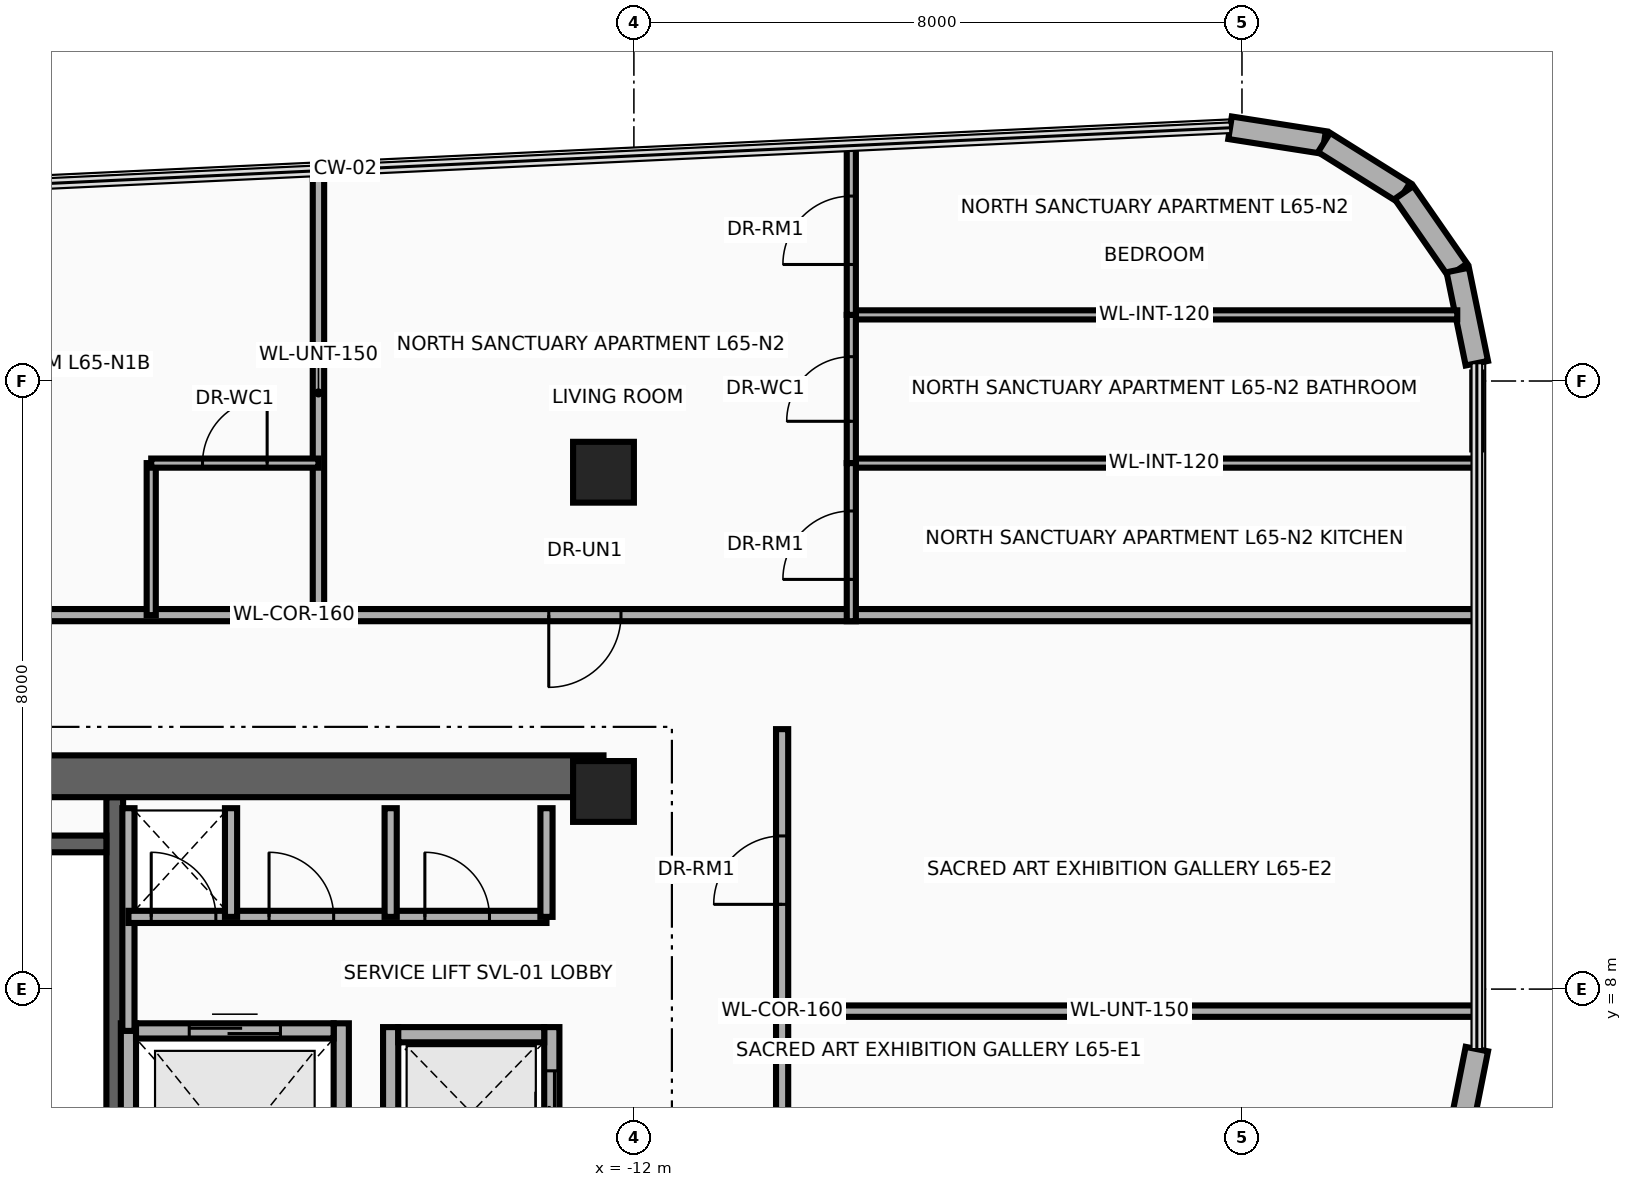
"""IFC4 building model, lengths in metres.
Left out: names, types, materials, properties, quantities, classifications, styles, units other than length and angle.
Written with IfcOpenShell. Run it as: python <this file> out.ifc"""

import sys

from ifc_helpers import new_model, si_unit, direction, frame, frame_2d, origin, origin_2d, place, context, subcontext, project, spatial, rectangle, extrude, source, transform, mapped, element, fill, save


model = new_model("IFC4")
c1 = context("Model", 3, precision=1e-05, world=origin(), true_north=direction((0.0, 1.0)))
c2 = subcontext(c1, "Body", "Model", "MODEL_VIEW")
j1 = project(units=[si_unit("LENGTHUNIT", "METRE"), si_unit("PLANEANGLEUNIT", "RADIAN")], contexts=[c1])
p1 = place(None, origin())
s1 = spatial("IfcSite", under=j1, at=p1, CompositionType="ELEMENT")
p2 = place(p1, origin())
s2 = spatial("IfcBuilding", under=s1, at=p2, CompositionType="ELEMENT")
p3 = place(p2, frame((0.0, 0.0, 251.0)))
s3 = spatial("IfcBuildingStorey", under=s2, at=p3, CompositionType="ELEMENT", Elevation=251.0)
p4 = place(p3, frame((-18.83, 1.78, 0.0), z_axis=(0.0, 0.0, 1.0), x_axis=(0.0, 1.0, 0.0)))
e1 = element("IfcWall", 1, at=p4, inside=s3, PredefinedType="SHEAR", context=c2, shape_type="SweptSolid", body=[
    extrude(rectangle(XDim=8.745, YDim=0.22, at=frame_2d((4.373, 0.0))), origin(), (0.0, 0.0, 1.0), 3.26),
])
p5 = place(p3, frame((-22.05, 9.91, 0.0), z_axis=(0.0, 0.0, 1.0), x_axis=(1.0, 0.0, 0.0)))
e2 = element("IfcWall", 2, at=p5, inside=s3, PredefinedType="SHEAR", context=c2, shape_type="SweptSolid", body=[
    extrude(rectangle(XDim=3.11, YDim=0.22, at=frame_2d((1.555, 0.0))), origin(), (0.0, 0.0, 1.0), 3.26),
])
p6 = place(p3, frame((-22.65, 10.8, 0.0), z_axis=(0.0, 0.0, 1.0), x_axis=(1.0, 0.0, 0.0)))
e3 = element("IfcWall", 3, at=p6, inside=s3, PredefinedType="SHEAR", context=c2, shape_type="SweptSolid", body=[
    extrude(rectangle(XDim=10.25, YDim=0.55, at=frame_2d((5.125, 0.0))), origin(), (0.0, 0.0, 1.0), 3.26),
])
m1 = source(origin(), c2, "Body", "SweptSolid", [
    extrude(rectangle(XDim=0.8, YDim=0.8, at=origin_2d()), origin(), (0.0, 0.0, 1.0), 3.5),
])
for number, where, z_axis, x_axis in (
    (4, (-12.4, 10.6, 0.0), (0.0, 0.0, 1.0), (1.0, 0.0, 0.0)),
    (5, (-12.4, 14.8, 0.0), (0.0, 0.0, 1.0), (1.0, 0.0, 0.0)),
):
    element("IfcColumn", number, at=place(p3, frame(where, z_axis=z_axis, x_axis=x_axis)), inside=s3, PredefinedType="COLUMN", context=c2, shape_type="MappedRepresentation", body=[
        mapped(m1, transform((0.0, 0.0, 0.0), x_axis=(1.0, 0.0, 0.0), y_axis=(0.0, 1.0, 0.0), z_axis=(0.0, 0.0, 1.0), scale=1.0)),
    ])
p7 = place(p3, frame((-4.157, 19.332, 0.0), z_axis=(0.0, 0.0, 1.0), x_axis=(0.987969236552, -0.15465053387, 0.0)))
e6 = element("IfcWall", 6, at=p7, inside=s3, PredefinedType="SOLIDWALL", context=c2, shape_type="SweptSolid", body=[
    extrude(rectangle(XDim=1.252, YDim=0.3, at=frame_2d((0.626, 0.0))), origin(), (0.0, 0.0, 1.0), 3.26),
])
for number, where, z_axis, x_axis in (
    (7, (-2.92, 19.138, 0.0), (0.0, 0.0, 1.0), (0.847, -0.531, 0.0)),
    (8, (-1.869, 18.48, 0.0), (0.0, 0.0, 1.0), (0.57, -0.822, 0.0)),
):
    element("IfcWall", number, at=place(p3, frame(where, z_axis=z_axis, x_axis=x_axis)), inside=s3, PredefinedType="SOLIDWALL", context=c2, shape_type="SweptSolid", body=[
        extrude(rectangle(XDim=1.24, YDim=0.3, at=frame_2d((0.62, 0.0))), origin(), (0.0, 0.0, 1.0), 3.26),
    ])
p8 = place(p3, frame((-1.161, 17.461, 0.0), z_axis=(0.0, 0.0, 1.0), x_axis=(0.20087696073, -0.979616479367, 0.0)))
e9 = element("IfcWall", 9, at=p8, inside=s3, PredefinedType="SOLIDWALL", context=c2, shape_type="SweptSolid", body=[
    extrude(rectangle(XDim=1.252, YDim=0.3, at=frame_2d((0.626, 0.0))), origin(), (0.0, 0.0, 1.0), 3.26),
])
p9 = place(p3, frame((-0.91, 7.211, 0.0), z_axis=(0.0, 0.0, 1.0), x_axis=(-0.195189223115, -0.980765602568, 0.0)))
e10 = element("IfcWall", 10, at=p9, inside=s3, PredefinedType="SOLIDWALL", context=c2, shape_type="SweptSolid", body=[
    extrude(rectangle(XDim=1.216, YDim=0.3, at=frame_2d((0.608, 0.0))), origin(), (0.0, 0.0, 1.0), 3.26),
])
for number, where, z_axis, x_axis in (
    (11, (-18.65, 4.225, 0.0), (0.0, 0.0, 1.0), (0.0, 1.0, 0.0)),
    (12, (-15.85, 4.225, 0.0), (0.0, 0.0, 1.0), (0.0, 1.0, 0.0)),
):
    element("IfcWall", number, at=place(p3, frame(where, z_axis=z_axis, x_axis=x_axis)), inside=s3, PredefinedType="MOVABLE", context=c2, shape_type="SweptSolid", body=[
        extrude(rectangle(XDim=3.325, YDim=0.2, at=frame_2d((1.663, 0.0))), origin(), (0.0, 0.0, 1.0), 3.26),
    ])
p10 = place(p3, frame((-18.55, 7.45, 0.0), z_axis=(0.0, 0.0, 1.0), x_axis=(1.0, 0.0, 0.0)))
e13 = element("IfcWall", 13, at=p10, inside=s3, PredefinedType="MOVABLE", context=c2, shape_type="SweptSolid", body=[
    extrude(rectangle(XDim=2.6, YDim=0.2, at=frame_2d((1.3, 0.0))), origin(), (0.0, 0.0, 1.0), 3.26),
])
p11 = place(p10, frame((0.7, 0.0, 0.0)))
e14 = element("IfcOpeningElement", 14, at=p11, cuts=e13, PredefinedType="OPENING", context=c2, shape_type="SweptSolid", body=[
    extrude(rectangle(XDim=1.2, YDim=2.1, at=frame_2d((0.6, 1.05))), frame((0.0, 0.115, 0.0), z_axis=(0.0, -1.0, 0.0), x_axis=(1.0, 0.0, 0.0)), (0.0, 0.0, 1.0), 0.23),
])
p12 = place(p3, frame((-15.2, 5.25, 0.0), z_axis=(0.0, 0.0, 1.0), x_axis=(0.0, 1.0, 0.0)))
e15 = element("IfcWall", 15, at=p12, inside=s3, PredefinedType="MOVABLE", context=c2, shape_type="SweptSolid", body=[
    extrude(rectangle(XDim=2.25, YDim=0.2, at=frame_2d((1.125, 0.0))), origin(), (0.0, 0.0, 1.0), 3.26),
])
p13 = place(p3, frame((-13.08, 5.25, 0.0), z_axis=(0.0, 0.0, 1.0), x_axis=(0.0, 1.0, 0.0)))
e16 = element("IfcWall", 16, at=p13, inside=s3, PredefinedType="MOVABLE", context=c2, shape_type="SweptSolid", body=[
    extrude(rectangle(XDim=2.25, YDim=0.2, at=frame_2d((1.125, 0.0))), origin(), (0.0, 0.0, 1.0), 3.26),
])
p14 = place(p13, frame((0.575, 0.0, 0.0)))
e17 = element("IfcOpeningElement", 17, at=p14, cuts=e16, PredefinedType="OPENING", context=c2, shape_type="SweptSolid", body=[
    extrude(rectangle(XDim=1.1, YDim=2.1, at=frame_2d((0.55, 1.05))), frame((0.0, 0.115, 0.0), z_axis=(0.0, -1.0, 0.0), x_axis=(1.0, 0.0, 0.0)), (0.0, 0.0, 1.0), 0.23),
])
p15 = place(p3, frame((-15.1, 7.4, 0.0), z_axis=(0.0, 0.0, 1.0), x_axis=(1.0, 0.0, 0.0)))
e18 = element("IfcWall", 18, at=p15, inside=s3, PredefinedType="MOVABLE", context=c2, shape_type="SweptSolid", body=[
    extrude(rectangle(XDim=1.92, YDim=0.2, at=frame_2d((0.96, 0.0))), origin(), (0.0, 0.0, 1.0), 3.26),
])
p16 = place(p3, frame((-18.65, 7.45, 0.0), z_axis=(0.0, 0.0, 1.0), x_axis=(0.0, 1.0, 0.0)))
e19 = element("IfcWall", 19, at=p16, inside=s3, PredefinedType="PARTITIONING", context=c2, shape_type="SweptSolid", body=[
    extrude(rectangle(XDim=2.93, YDim=0.16, at=frame_2d((1.465, 0.0))), origin(), (0.0, 0.0, 1.0), 3.26),
])
p17 = place(p3, frame((-18.65, 8.95, 0.0), z_axis=(0.0, 0.0, 1.0), x_axis=(1.0, 0.0, 0.0)))
e20 = element("IfcWall", 20, at=p17, inside=s3, PredefinedType="PARTITIONING", context=c2, shape_type="SweptSolid", body=[
    extrude(rectangle(XDim=5.5, YDim=0.16, at=frame_2d((2.75, 0.0))), origin(), (0.0, 0.0, 1.0), 3.26),
])
p18 = place(p17, frame((0.3, 0.0, 0.0)))
e21 = element("IfcOpeningElement", 21, at=p18, cuts=e20, PredefinedType="OPENING", context=c2, shape_type="SweptSolid", body=[
    extrude(rectangle(XDim=0.85, YDim=2.05, at=frame_2d((0.425, 1.025))), frame((0.0, 0.095, 0.0), z_axis=(0.0, -1.0, 0.0), x_axis=(1.0, 0.0, 0.0)), (0.0, 0.0, 1.0), 0.19),
])
p19 = place(p17, frame((1.85, 0.0, 0.0)))
e22 = element("IfcOpeningElement", 22, at=p19, cuts=e20, PredefinedType="OPENING", context=c2, shape_type="SweptSolid", body=[
    extrude(rectangle(XDim=0.85, YDim=2.05, at=frame_2d((0.425, 1.025))), frame((0.0, 0.095, 0.0), z_axis=(0.0, -1.0, 0.0), x_axis=(1.0, 0.0, 0.0)), (0.0, 0.0, 1.0), 0.19),
])
p20 = place(p17, frame((3.9, 0.0, 0.0)))
e23 = element("IfcOpeningElement", 23, at=p20, cuts=e20, PredefinedType="OPENING", context=c2, shape_type="SweptSolid", body=[
    extrude(rectangle(XDim=0.85, YDim=2.05, at=frame_2d((0.425, 1.025))), frame((0.0, 0.095, 0.0), z_axis=(0.0, -1.0, 0.0), x_axis=(1.0, 0.0, 0.0)), (0.0, 0.0, 1.0), 0.19),
])
for number, where, z_axis, x_axis in (
    (24, (-13.15, 8.95, 0.0), (0.0, 0.0, 1.0), (0.0, 1.0, 0.0)),
    (25, (-17.3, 8.95, 0.0), (0.0, 0.0, 1.0), (0.0, 1.0, 0.0)),
    (26, (-15.2, 8.95, 0.0), (0.0, 0.0, 1.0), (0.0, 1.0, 0.0)),
):
    element("IfcWall", number, at=place(p3, frame(where, z_axis=z_axis, x_axis=x_axis)), inside=s3, PredefinedType="PARTITIONING", context=c2, shape_type="SweptSolid", body=[
        extrude(rectangle(XDim=1.43, YDim=0.16, at=frame_2d((0.715, 0.0))), origin(), (0.0, 0.0, 1.0), 3.26),
    ])
p21 = place(p3, frame((-32.04, 12.92, 0.0), z_axis=(0.0, 0.0, 1.0), x_axis=(1.0, 0.0, 0.0)))
e27 = element("IfcWall", 27, at=p21, inside=s3, PredefinedType="PARTITIONING", context=c2, shape_type="SweptSolid", body=[
    extrude(rectangle(XDim=31.13, YDim=0.16, at=frame_2d((15.565, 0.0))), origin(), (0.0, 0.0, 1.0), 2.634),
])
p22 = place(p21, frame((3.498, 0.0, 0.0)))
e28 = element("IfcOpeningElement", 28, at=p22, cuts=e27, PredefinedType="OPENING", context=c2, shape_type="SweptSolid", body=[
    extrude(rectangle(XDim=0.95, YDim=2.15, at=frame_2d((0.475, 1.075))), frame((0.0, 0.095, 0.0), z_axis=(0.0, -1.0, 0.0), x_axis=(1.0, 0.0, 0.0)), (0.0, 0.0, 1.0), 0.19),
])
p23 = place(p21, frame((10.342, 0.0, 0.0)))
e29 = element("IfcOpeningElement", 29, at=p23, cuts=e27, PredefinedType="OPENING", context=c2, shape_type="SweptSolid", body=[
    extrude(rectangle(XDim=0.95, YDim=2.15, at=frame_2d((0.475, 1.075))), frame((0.0, 0.095, 0.0), z_axis=(0.0, -1.0, 0.0), x_axis=(1.0, 0.0, 0.0)), (0.0, 0.0, 1.0), 0.19),
])
p24 = place(p21, frame((18.92, 0.0, 0.0)))
e30 = element("IfcOpeningElement", 30, at=p24, cuts=e27, PredefinedType="OPENING", context=c2, shape_type="SweptSolid", body=[
    extrude(rectangle(XDim=0.95, YDim=2.15, at=frame_2d((0.475, 1.075))), frame((0.0, 0.095, 0.0), z_axis=(0.0, -1.0, 0.0), x_axis=(1.0, 0.0, 0.0)), (0.0, 0.0, 1.0), 0.19),
])
p25 = place(p3, frame((-16.15, 12.92, 0.0), z_axis=(0.0, 0.0, 1.0), x_axis=(0.0, 1.0, 0.0)))
e31 = element("IfcWall", 31, at=p25, inside=s3, PredefinedType="PARTITIONING", context=c2, shape_type="SweptSolid", body=[
    extrude(rectangle(XDim=5.846, YDim=0.15, at=frame_2d((2.923, 0.0))), origin(), (0.0, 0.0, 1.0), 2.544),
])
p26 = place(p3, frame((-18.35, 12.92, 0.0), z_axis=(0.0, 0.0, 1.0), x_axis=(0.0, 1.0, 0.0)))
e32 = element("IfcWall", 32, at=p26, inside=s3, PredefinedType="PARTITIONING", context=c2, shape_type="SweptSolid", body=[
    extrude(rectangle(XDim=2.0, YDim=0.12, at=frame_2d((1.0, 0.0))), origin(), (0.0, 0.0, 1.0), 2.544),
])
p27 = place(p3, frame((-18.35, 14.92, 0.0), z_axis=(0.0, 0.0, 1.0), x_axis=(1.0, 0.0, 0.0)))
e33 = element("IfcWall", 33, at=p27, inside=s3, PredefinedType="PARTITIONING", context=c2, shape_type="SweptSolid", body=[
    extrude(rectangle(XDim=2.2, YDim=0.12, at=frame_2d((1.1, 0.0))), origin(), (0.0, 0.0, 1.0), 2.544),
])
p28 = place(p27, frame((0.675, 0.0, 0.0)))
e34 = element("IfcOpeningElement", 34, at=p28, cuts=e33, PredefinedType="OPENING", context=c2, shape_type="SweptSolid", body=[
    extrude(rectangle(XDim=0.85, YDim=2.1, at=frame_2d((0.425, 1.05))), frame((0.0, 0.075, 0.0), z_axis=(0.0, -1.0, 0.0), x_axis=(1.0, 0.0, 0.0)), (0.0, 0.0, 1.0), 0.15),
])
p29 = place(p3, frame((-9.14, 14.92, 0.0), z_axis=(0.0, 0.0, 1.0), x_axis=(1.0, 0.0, 0.0)))
e35 = element("IfcWall", 35, at=p29, inside=s3, PredefinedType="PARTITIONING", context=c2, shape_type="SweptSolid", body=[
    extrude(rectangle(XDim=8.23, YDim=0.12, at=frame_2d((4.115, 0.0))), origin(), (0.0, 0.0, 1.0), 3.26),
])
p30 = place(p3, frame((-9.14, 16.87, 0.0), z_axis=(0.0, 0.0, 1.0), x_axis=(1.0, 0.0, 0.0)))
e36 = element("IfcWall", 36, at=p30, inside=s3, PredefinedType="PARTITIONING", context=c2, shape_type="SweptSolid", body=[
    extrude(rectangle(XDim=7.972, YDim=0.12, at=frame_2d((3.986, 0.0))), origin(), (0.0, 0.0, 1.0), 3.26),
])
p31 = place(p3, frame((-9.14, 14.92, 0.0), z_axis=(0.0, 0.0, 1.0), x_axis=(0.0, 1.0, 0.0)))
e37 = element("IfcWall", 37, at=p31, inside=s3, PredefinedType="PARTITIONING", context=c2, shape_type="SweptSolid", body=[
    extrude(rectangle(XDim=1.95, YDim=0.12, at=frame_2d((0.975, 0.0))), origin(), (0.0, 0.0, 1.0), 3.26),
])
p32 = place(p31, frame((0.55, 0.0, 0.0)))
e38 = element("IfcOpeningElement", 38, at=p32, cuts=e37, PredefinedType="OPENING", context=c2, shape_type="SweptSolid", body=[
    extrude(rectangle(XDim=0.85, YDim=2.1, at=frame_2d((0.425, 1.05))), frame((0.0, 0.075, 0.0), z_axis=(0.0, -1.0, 0.0), x_axis=(1.0, 0.0, 0.0)), (0.0, 0.0, 1.0), 0.15),
])
p33 = place(p3, frame((-9.14, 12.84, 0.0), z_axis=(0.0, 0.0, 1.0), x_axis=(0.0, 1.0, 0.0)))
e39 = element("IfcWall", 39, at=p33, inside=s3, PredefinedType="PARTITIONING", context=c2, shape_type="SweptSolid", body=[
    extrude(rectangle(XDim=2.08, YDim=0.12, at=frame_2d((1.04, 0.0))), origin(), (0.0, 0.0, 1.0), 3.26),
])
p34 = place(p33, frame((0.55, 0.0, 0.0)))
e40 = element("IfcOpeningElement", 40, at=p34, cuts=e39, PredefinedType="OPENING", context=c2, shape_type="SweptSolid", body=[
    extrude(rectangle(XDim=0.9, YDim=2.1, at=frame_2d((0.45, 1.05))), frame((0.0, 0.075, 0.0), z_axis=(0.0, -1.0, 0.0), x_axis=(1.0, 0.0, 0.0)), (0.0, 0.0, 1.0), 0.15),
])
p35 = place(p3, frame((-9.14, 16.87, 0.0), z_axis=(0.0, 0.0, 1.0), x_axis=(0.0, 1.0, 0.0)))
e41 = element("IfcWall", 41, at=p35, inside=s3, PredefinedType="PARTITIONING", context=c2, shape_type="SweptSolid", body=[
    extrude(rectangle(XDim=2.227, YDim=0.12, at=frame_2d((1.113, 0.0))), origin(), (0.0, 0.0, 1.0), 3.26),
])
p36 = place(p35, frame((0.663, 0.0, 0.0)))
e42 = element("IfcOpeningElement", 42, at=p36, cuts=e41, PredefinedType="OPENING", context=c2, shape_type="SweptSolid", body=[
    extrude(rectangle(XDim=0.9, YDim=2.1, at=frame_2d((0.45, 1.05))), frame((0.0, 0.075, 0.0), z_axis=(0.0, -1.0, 0.0), x_axis=(1.0, 0.0, 0.0)), (0.0, 0.0, 1.0), 0.15),
])
p37 = place(p3, frame((-0.91, 15.1, 0.0), z_axis=(0.0, 0.0, 1.0), x_axis=(0.0, 1.0, 0.0)))
e43 = element("IfcWall", 43, at=p37, inside=s3, PredefinedType="PARTITIONING", context=c2, shape_type="SweptSolid", body=[
    extrude(rectangle(XDim=1.012, YDim=0.12, at=frame_2d((0.506, 0.0))), origin(), (0.0, 0.0, 1.0), 3.26),
])
p38 = place(p3, frame((-10.05, 4.0, 0.0), z_axis=(0.0, 0.0, 1.0), x_axis=(0.0, 1.0, 0.0)))
e44 = element("IfcWall", 44, at=p38, inside=s3, PredefinedType="PARTITIONING", context=c2, shape_type="SweptSolid", body=[
    extrude(rectangle(XDim=7.42, YDim=0.16, at=frame_2d((3.71, 0.0))), origin(), (0.0, 0.0, 1.0), 3.26),
])
p39 = place(p38, frame((1.405, 0.0, 0.0)))
e45 = element("IfcOpeningElement", 45, at=p39, cuts=e44, PredefinedType="OPENING", context=c2, shape_type="SweptSolid", body=[
    extrude(rectangle(XDim=0.9, YDim=2.1, at=frame_2d((0.45, 1.05))), frame((0.0, 0.095, 0.0), z_axis=(0.0, -1.0, 0.0), x_axis=(1.0, 0.0, 0.0)), (0.0, 0.0, 1.0), 0.19),
])
p40 = place(p38, frame((5.115, 0.0, 0.0)))
e46 = element("IfcOpeningElement", 46, at=p40, cuts=e44, PredefinedType="OPENING", context=c2, shape_type="SweptSolid", body=[
    extrude(rectangle(XDim=0.9, YDim=2.1, at=frame_2d((0.45, 1.05))), frame((0.0, 0.095, 0.0), z_axis=(0.0, -1.0, 0.0), x_axis=(1.0, 0.0, 0.0)), (0.0, 0.0, 1.0), 0.19),
])
p41 = place(p3, frame((-10.05, 7.71, 0.0), z_axis=(0.0, 0.0, 1.0), x_axis=(1.0, 0.0, 0.0)))
e47 = element("IfcWall", 47, at=p41, inside=s3, PredefinedType="PARTITIONING", context=c2, shape_type="SweptSolid", body=[
    extrude(rectangle(XDim=9.14, YDim=0.15, at=frame_2d((4.57, 0.0))), origin(), (0.0, 0.0, 1.0), 3.26),
])
p42 = place(p11, origin())
e48 = element("IfcDoor", 48, at=p42, inside=s3, OperationType="DOUBLE_DOOR_SLIDING", PredefinedType="DOOR", context=c2, shape_type="SweptSolid", body=[
    extrude(rectangle(XDim=1.2, YDim=2.1, at=frame_2d((0.6, 1.05))), frame((0.0, 0.025, 0.0), z_axis=(0.0, -1.0, 0.0), x_axis=(1.0, 0.0, 0.0)), (0.0, 0.0, 1.0), 0.05),
])
fill(e14, e48)
p43 = place(p14, origin())
e49 = element("IfcDoor", 49, at=p43, inside=s3, OperationType="DOUBLE_DOOR_SLIDING", PredefinedType="DOOR", context=c2, shape_type="SweptSolid", body=[
    extrude(rectangle(XDim=1.1, YDim=2.1, at=frame_2d((0.55, 1.05))), frame((0.0, 0.025, 0.0), z_axis=(0.0, -1.0, 0.0), x_axis=(1.0, 0.0, 0.0)), (0.0, 0.0, 1.0), 0.05),
])
fill(e17, e49)
p44 = place(p18, origin())
e50 = element("IfcDoor", 50, at=p44, inside=s3, OperationType="SINGLE_SWING_LEFT", PredefinedType="DOOR", context=c2, shape_type="SweptSolid", body=[
    extrude(rectangle(XDim=0.85, YDim=2.05, at=frame_2d((0.425, 1.025))), frame((0.0, 0.025, 0.0), z_axis=(0.0, -1.0, 0.0), x_axis=(1.0, 0.0, 0.0)), (0.0, 0.0, 1.0), 0.05),
])
fill(e21, e50)
p45 = place(p19, origin())
e51 = element("IfcDoor", 51, at=p45, inside=s3, OperationType="SINGLE_SWING_RIGHT", PredefinedType="DOOR", context=c2, shape_type="SweptSolid", body=[
    extrude(rectangle(XDim=0.85, YDim=2.05, at=frame_2d((0.425, 1.025))), frame((0.0, 0.025, 0.0), z_axis=(0.0, -1.0, 0.0), x_axis=(1.0, 0.0, 0.0)), (0.0, 0.0, 1.0), 0.05),
])
fill(e22, e51)
p46 = place(p20, origin())
e52 = element("IfcDoor", 52, at=p46, inside=s3, OperationType="SINGLE_SWING_LEFT", PredefinedType="DOOR", context=c2, shape_type="SweptSolid", body=[
    extrude(rectangle(XDim=0.85, YDim=2.05, at=frame_2d((0.425, 1.025))), frame((0.0, 0.025, 0.0), z_axis=(0.0, -1.0, 0.0), x_axis=(1.0, 0.0, 0.0)), (0.0, 0.0, 1.0), 0.05),
])
fill(e23, e52)
p47 = place(p28, origin())
e53 = element("IfcDoor", 53, at=p47, inside=s3, OperationType="SINGLE_SWING_RIGHT", PredefinedType="DOOR", context=c2, shape_type="SweptSolid", body=[
    extrude(rectangle(XDim=0.85, YDim=2.1, at=frame_2d((0.425, 1.05))), frame((0.0, 0.025, 0.0), z_axis=(0.0, -1.0, 0.0), x_axis=(1.0, 0.0, 0.0)), (0.0, 0.0, 1.0), 0.05),
])
fill(e34, e53)
p48 = place(p24, frame((0.95, 0.0, 0.0), z_axis=(0.0, 0.0, 1.0), x_axis=(-1.0, 0.0, 0.0)))
e54 = element("IfcDoor", 54, at=p48, inside=s3, OperationType="SINGLE_SWING_LEFT", PredefinedType="DOOR", context=c2, shape_type="SweptSolid", body=[
    extrude(rectangle(XDim=0.95, YDim=2.15, at=frame_2d((0.475, 1.075))), frame((0.0, 0.025, 0.0), z_axis=(0.0, -1.0, 0.0), x_axis=(1.0, 0.0, 0.0)), (0.0, 0.0, 1.0), 0.05),
])
fill(e30, e54)
p49 = place(p32, origin())
e55 = element("IfcDoor", 55, at=p49, inside=s3, OperationType="SINGLE_SWING_RIGHT", PredefinedType="DOOR", context=c2, shape_type="SweptSolid", body=[
    extrude(rectangle(XDim=0.85, YDim=2.1, at=frame_2d((0.425, 1.05))), frame((0.0, 0.025, 0.0), z_axis=(0.0, -1.0, 0.0), x_axis=(1.0, 0.0, 0.0)), (0.0, 0.0, 1.0), 0.05),
])
fill(e38, e55)
p50 = place(p34, origin())
e56 = element("IfcDoor", 56, at=p50, inside=s3, OperationType="SINGLE_SWING_LEFT", PredefinedType="DOOR", context=c2, shape_type="SweptSolid", body=[
    extrude(rectangle(XDim=0.9, YDim=2.1, at=frame_2d((0.45, 1.05))), frame((0.0, 0.025, 0.0), z_axis=(0.0, -1.0, 0.0), x_axis=(1.0, 0.0, 0.0)), (0.0, 0.0, 1.0), 0.05),
])
fill(e40, e56)
p51 = place(p36, origin())
e57 = element("IfcDoor", 57, at=p51, inside=s3, OperationType="SINGLE_SWING_RIGHT", PredefinedType="DOOR", context=c2, shape_type="SweptSolid", body=[
    extrude(rectangle(XDim=0.9, YDim=2.1, at=frame_2d((0.45, 1.05))), frame((0.0, 0.025, 0.0), z_axis=(0.0, -1.0, 0.0), x_axis=(1.0, 0.0, 0.0)), (0.0, 0.0, 1.0), 0.05),
])
fill(e42, e57)
p52 = place(p40, origin())
e58 = element("IfcDoor", 58, at=p52, inside=s3, OperationType="SINGLE_SWING_RIGHT", PredefinedType="DOOR", context=c2, shape_type="SweptSolid", body=[
    extrude(rectangle(XDim=0.9, YDim=2.1, at=frame_2d((0.45, 1.05))), frame((0.0, 0.025, 0.0), z_axis=(0.0, -1.0, 0.0), x_axis=(1.0, 0.0, 0.0)), (0.0, 0.0, 1.0), 0.05),
])
fill(e46, e58)
save(model, sys.argv[1])
